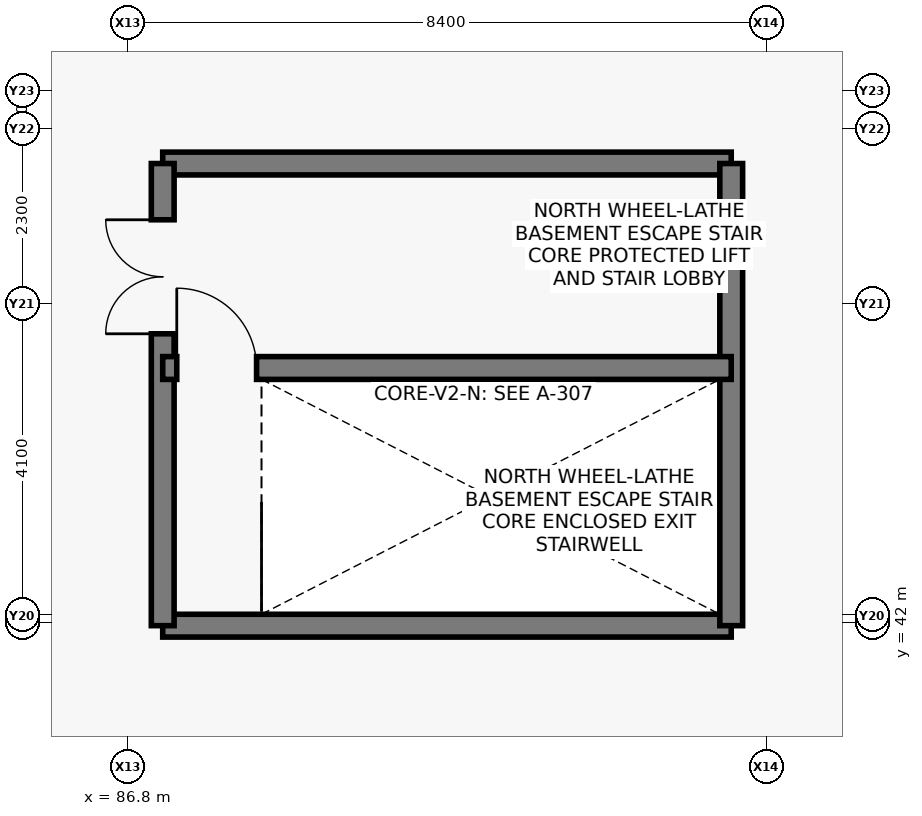
"""IFC4 building model, lengths in metres.
Left out: names, types, materials, properties, quantities, classifications, styles, units other than length and angle.
Written with IfcOpenShell. Run it as: python <this file> out.ifc"""

import sys

from ifc_helpers import new_model, si_unit, direction, frame, frame_2d, origin, place, context, subcontext, project, spatial, rectangle, extrude, element, fill, save


model = new_model("IFC4")
c1 = context("Model", 3, precision=1e-05, world=origin(), true_north=direction((0.0, 1.0)))
c2 = subcontext(c1, "Body", "Model", "MODEL_VIEW")
j1 = project(units=[si_unit("LENGTHUNIT", "METRE"), si_unit("PLANEANGLEUNIT", "RADIAN")], contexts=[c1])
p1 = place(None, origin())
s1 = spatial("IfcSite", under=j1, at=p1, CompositionType="ELEMENT")
p2 = place(p1, origin())
s2 = spatial("IfcBuilding", under=s1, at=p2, CompositionType="ELEMENT")
p3 = place(p2, origin())
s3 = spatial("IfcBuildingStorey", under=s2, at=p3, CompositionType="ELEMENT", Elevation=0.0)
for number, where, z_axis, x_axis in (
    (1, (87.26, 41.96, 0.0), (0.0, 0.0, 1.0), (1.0, 0.0, 0.0)),
    (2, (87.26, 48.04, 0.0), (0.0, 0.0, 1.0), (1.0, 0.0, 0.0)),
):
    element("IfcWall", number, at=place(p3, frame(where, z_axis=z_axis, x_axis=x_axis)), inside=s3, PredefinedType="SHEAR", context=c2, shape_type="SweptSolid", body=[
        extrude(rectangle(XDim=7.48, YDim=0.3, at=frame_2d((3.74, 0.0))), origin(), (0.0, 0.0, 1.0), 5.72),
    ])
p4 = place(p3, frame((87.26, 41.96, 0.0), z_axis=(0.0, 0.0, 1.0), x_axis=(0.0, 1.0, 0.0)))
e3 = element("IfcWall", 3, at=p4, inside=s3, PredefinedType="SHEAR", context=c2, shape_type="SweptSolid", body=[
    extrude(rectangle(XDim=6.08, YDim=0.3, at=frame_2d((3.04, 0.0))), origin(), (0.0, 0.0, 1.0), 5.72),
])
p5 = place(p4, frame((3.84, 0.0, 0.0)))
e4 = element("IfcOpeningElement", 4, at=p5, cuts=e3, PredefinedType="OPENING", context=c2, shape_type="SweptSolid", body=[
    extrude(rectangle(XDim=1.5, YDim=2.2, at=frame_2d((0.75, 1.1))), frame((0.0, 0.16, 0.0), z_axis=(0.0, -1.0, 0.0), x_axis=(1.0, 0.0, 0.0)), (0.0, 0.0, 1.0), 0.32),
])
p6 = place(p3, frame((94.74, 41.96, 0.0), z_axis=(0.0, 0.0, 1.0), x_axis=(0.0, 1.0, 0.0)))
e5 = element("IfcWall", 5, at=p6, inside=s3, PredefinedType="SHEAR", context=c2, shape_type="SweptSolid", body=[
    extrude(rectangle(XDim=6.08, YDim=0.3, at=frame_2d((3.04, 0.0))), origin(), (0.0, 0.0, 1.0), 5.72),
])
p7 = place(p3, frame((87.26, 45.35, 0.0), z_axis=(0.0, 0.0, 1.0), x_axis=(1.0, 0.0, 0.0)))
e6 = element("IfcWall", 6, at=p7, inside=s3, PredefinedType="SHEAR", context=c2, shape_type="SweptSolid", body=[
    extrude(rectangle(XDim=7.48, YDim=0.3, at=frame_2d((3.74, 0.0))), origin(), (0.0, 0.0, 1.0), 5.72),
])
p8 = place(p7, frame((0.185, 0.0, 0.0)))
e7 = element("IfcOpeningElement", 7, at=p8, cuts=e6, PredefinedType="OPENING", context=c2, shape_type="SweptSolid", body=[
    extrude(rectangle(XDim=1.05, YDim=2.15, at=frame_2d((0.525, 1.075))), frame((0.0, 0.16, 0.0), z_axis=(0.0, -1.0, 0.0), x_axis=(1.0, 0.0, 0.0)), (0.0, 0.0, 1.0), 0.32),
])
p9 = place(p8, origin())
e8 = element("IfcDoor", 8, at=p9, inside=s3, OperationType="SINGLE_SWING_LEFT", PredefinedType="DOOR", context=c2, shape_type="SweptSolid", body=[
    extrude(rectangle(XDim=1.05, YDim=2.15, at=frame_2d((0.525, 1.075))), frame((0.0, 0.025, 0.0), z_axis=(0.0, -1.0, 0.0), x_axis=(1.0, 0.0, 0.0)), (0.0, 0.0, 1.0), 0.05),
])
fill(e7, e8)
p10 = place(p5, origin())
e9 = element("IfcDoor", 9, at=p10, inside=s3, OperationType="DOUBLE_DOOR_SINGLE_SWING", PredefinedType="DOOR", context=c2, shape_type="SweptSolid", body=[
    extrude(rectangle(XDim=1.5, YDim=2.2, at=frame_2d((0.75, 1.1))), frame((0.0, 0.025, 0.0), z_axis=(0.0, -1.0, 0.0), x_axis=(1.0, 0.0, 0.0)), (0.0, 0.0, 1.0), 0.05),
])
fill(e4, e9)
save(model, sys.argv[1])
